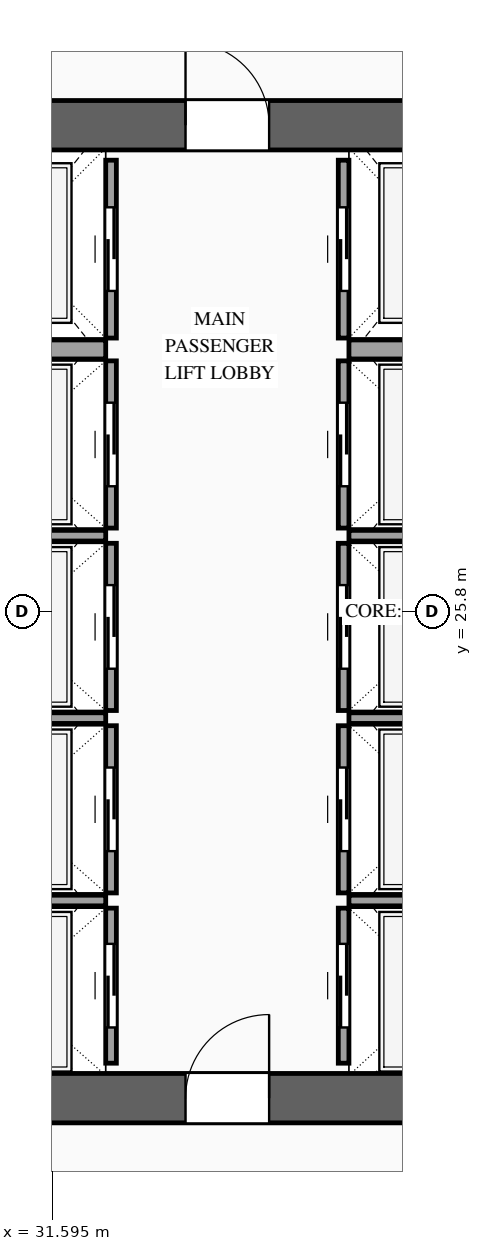
"""IFC4 building model, lengths in metres.
Left out: names, types, materials, properties, quantities, classifications, styles, units other than length and angle.
Written with IfcOpenShell. Run it as: python <this file> out.ifc"""

import sys

from ifc_helpers import new_model, si_unit, direction, frame, frame_2d, origin, place, context, subcontext, project, spatial, rectangle, extrude, source, transform, mapped, element, fill, save


model = new_model("IFC4")
c1 = context("Model", 3, precision=1e-05, world=origin(), true_north=direction((0.0, 1.0)))
c2 = subcontext(c1, "Body", "Model", "MODEL_VIEW")
j1 = project(units=[si_unit("LENGTHUNIT", "METRE"), si_unit("PLANEANGLEUNIT", "RADIAN")], contexts=[c1])
p1 = place(None, origin())
s1 = spatial("IfcSite", under=j1, at=p1, CompositionType="ELEMENT")
p2 = place(p1, origin())
s2 = spatial("IfcBuilding", under=s1, at=p2, CompositionType="ELEMENT")
p3 = place(p2, frame((0.0, 0.0, 166.8)))
s3 = spatial("IfcBuildingStorey", under=s2, at=p3, CompositionType="ELEMENT", Elevation=166.8)
p4 = place(p3, frame((23.475, 19.4, 0.0), z_axis=(0.0, 0.0, 1.0), x_axis=(1.0, 0.0, 0.0)))
e1 = element("IfcWall", 1, at=p4, inside=s3, PredefinedType="SHEAR", context=c2, shape_type="SweptSolid", body=[
    extrude(rectangle(XDim=27.05, YDim=0.65, at=frame_2d((13.525, 0.0))), origin(), (0.0, 0.0, 1.0), 4.8),
])
p5 = place(p4, frame((1.975, 0.0, 0.0)))
e2 = element("IfcOpeningElement", 2, at=p5, cuts=e1, PredefinedType="OPENING", context=c2, shape_type="SweptSolid", body=[
    extrude(rectangle(XDim=1.1, YDim=2.2, at=frame_2d((0.55, 1.1))), frame((0.0, 0.34, 0.0), z_axis=(0.0, -1.0, 0.0), x_axis=(1.0, 0.0, 0.0)), (0.0, 0.0, 1.0), 0.68),
])
p6 = place(p4, frame((9.875, 0.0, 0.0)))
e3 = element("IfcOpeningElement", 3, at=p6, cuts=e1, PredefinedType="OPENING", context=c2, shape_type="SweptSolid", body=[
    extrude(rectangle(XDim=1.1, YDim=2.2, at=frame_2d((0.55, 1.1))), frame((0.0, 0.34, 0.0), z_axis=(0.0, -1.0, 0.0), x_axis=(1.0, 0.0, 0.0)), (0.0, 0.0, 1.0), 0.68),
])
p7 = place(p4, frame((23.075, 0.0, 0.0)))
e4 = element("IfcOpeningElement", 4, at=p7, cuts=e1, PredefinedType="OPENING", context=c2, shape_type="SweptSolid", body=[
    extrude(rectangle(XDim=1.1, YDim=2.2, at=frame_2d((0.55, 1.1))), frame((0.0, 0.34, 0.0), z_axis=(0.0, -1.0, 0.0), x_axis=(1.0, 0.0, 0.0)), (0.0, 0.0, 1.0), 0.68),
])
p8 = place(p4, frame((19.695, 0.0, 0.0)))
e5 = element("IfcOpeningElement", 5, at=p8, cuts=e1, PredefinedType="OPENING", context=c2, shape_type="SweptSolid", body=[
    extrude(rectangle(XDim=0.9, YDim=2.15, at=frame_2d((0.45, 1.075))), frame((0.0, 0.34, 0.0), z_axis=(0.0, -1.0, 0.0), x_axis=(1.0, 0.0, 0.0)), (0.0, 0.0, 1.0), 0.68),
])
p9 = place(p4, frame((18.255, 0.0, 0.0)))
e6 = element("IfcOpeningElement", 6, at=p9, cuts=e1, PredefinedType="OPENING", context=c2, shape_type="SweptSolid", body=[
    extrude(rectangle(XDim=0.9, YDim=2.15, at=frame_2d((0.45, 1.075))), frame((0.0, 0.34, 0.0), z_axis=(0.0, -1.0, 0.0), x_axis=(1.0, 0.0, 0.0)), (0.0, 0.0, 1.0), 0.68),
])
p10 = place(p3, frame((23.475, 32.2, 0.0), z_axis=(0.0, 0.0, 1.0), x_axis=(1.0, 0.0, 0.0)))
e7 = element("IfcWall", 7, at=p10, inside=s3, PredefinedType="SHEAR", context=c2, shape_type="SweptSolid", body=[
    extrude(rectangle(XDim=27.05, YDim=0.65, at=frame_2d((13.525, 0.0))), origin(), (0.0, 0.0, 1.0), 4.8),
])
p11 = place(p10, frame((4.595, 0.0, 0.0)))
e8 = element("IfcOpeningElement", 8, at=p11, cuts=e7, PredefinedType="OPENING", context=c2, shape_type="SweptSolid", body=[
    extrude(rectangle(XDim=0.9, YDim=2.15, at=frame_2d((0.45, 1.075))), frame((0.0, 0.34, 0.0), z_axis=(0.0, -1.0, 0.0), x_axis=(1.0, 0.0, 0.0)), (0.0, 0.0, 1.0), 0.68),
])
p12 = place(p10, frame((9.875, 0.0, 0.0)))
e9 = element("IfcOpeningElement", 9, at=p12, cuts=e7, PredefinedType="OPENING", context=c2, shape_type="SweptSolid", body=[
    extrude(rectangle(XDim=1.1, YDim=2.2, at=frame_2d((0.55, 1.1))), frame((0.0, 0.34, 0.0), z_axis=(0.0, -1.0, 0.0), x_axis=(1.0, 0.0, 0.0)), (0.0, 0.0, 1.0), 0.68),
])
p13 = place(p10, frame((15.725, 0.0, 0.0)))
e10 = element("IfcOpeningElement", 10, at=p13, cuts=e7, PredefinedType="OPENING", context=c2, shape_type="SweptSolid", body=[
    extrude(rectangle(XDim=1.1, YDim=2.2, at=frame_2d((0.55, 1.1))), frame((0.0, 0.34, 0.0), z_axis=(0.0, -1.0, 0.0), x_axis=(1.0, 0.0, 0.0)), (0.0, 0.0, 1.0), 0.68),
])
p14 = place(p10, frame((18.825, 0.0, 0.0)))
e11 = element("IfcOpeningElement", 11, at=p14, cuts=e7, PredefinedType="OPENING", context=c2, shape_type="SweptSolid", body=[
    extrude(rectangle(XDim=1.1, YDim=2.2, at=frame_2d((0.55, 1.1))), frame((0.0, 0.34, 0.0), z_axis=(0.0, -1.0, 0.0), x_axis=(1.0, 0.0, 0.0)), (0.0, 0.0, 1.0), 0.68),
])
p15 = place(p3, frame((32.37, 19.86, 0.0), z_axis=(0.0, 0.0, 1.0), x_axis=(0.0, 1.0, 0.0)))
e12 = element("IfcWall", 12, at=p15, inside=s3, PredefinedType="SOLIDWALL", context=c2, shape_type="SweptSolid", body=[
    extrude(rectangle(XDim=2.04, YDim=0.14, at=frame_2d((1.02, 0.0))), origin(), (0.0, 0.0, 1.0), 4.5),
])
p16 = place(p15, frame((0.47, 0.0, 0.0)))
e13 = element("IfcOpeningElement", 13, at=p16, cuts=e12, PredefinedType="OPENING", context=c2, shape_type="SweptSolid", body=[
    extrude(rectangle(XDim=1.1, YDim=2.2, at=frame_2d((0.55, 1.1))), frame((0.0, 0.085, 0.0), z_axis=(0.0, -1.0, 0.0), x_axis=(1.0, 0.0, 0.0)), (0.0, 0.0, 1.0), 0.17),
])
m1 = source(origin(), c2, "Body", "SweptSolid", [
    extrude(rectangle(XDim=2.5, YDim=0.14, at=frame_2d((1.25, 0.0))), origin(), (0.0, 0.0, 1.0), 4.5),
])
p17 = place(p3, frame((29.8, 22.0, 0.0), z_axis=(0.0, 0.0, 1.0), x_axis=(1.0, 0.0, 0.0)))
e14 = element("IfcWall", 14, at=p17, inside=s3, PredefinedType="SOLIDWALL", context=c2, shape_type="MappedRepresentation", body=[
    mapped(m1, transform((0.0, 0.0, 0.0), scale=1.0)),
])
p18 = place(p3, frame((32.37, 22.1, 0.0), z_axis=(0.0, 0.0, 1.0), x_axis=(0.0, 1.0, 0.0)))
e15 = element("IfcWall", 15, at=p18, inside=s3, PredefinedType="SOLIDWALL", context=c2, shape_type="SweptSolid", body=[
    extrude(rectangle(XDim=2.2, YDim=0.14, at=frame_2d((1.1, 0.0))), origin(), (0.0, 0.0, 1.0), 4.5),
])
p19 = place(p18, frame((0.55, 0.0, 0.0)))
e16 = element("IfcOpeningElement", 16, at=p19, cuts=e15, PredefinedType="OPENING", context=c2, shape_type="SweptSolid", body=[
    extrude(rectangle(XDim=1.1, YDim=2.2, at=frame_2d((0.55, 1.1))), frame((0.0, 0.085, 0.0), z_axis=(0.0, -1.0, 0.0), x_axis=(1.0, 0.0, 0.0)), (0.0, 0.0, 1.0), 0.17),
])
p20 = place(p3, frame((29.8, 24.4, 0.0), z_axis=(0.0, 0.0, 1.0), x_axis=(1.0, 0.0, 0.0)))
e17 = element("IfcWall", 17, at=p20, inside=s3, PredefinedType="SOLIDWALL", context=c2, shape_type="MappedRepresentation", body=[
    mapped(m1, transform((0.0, 0.0, 0.0), scale=1.0)),
])
p21 = place(p3, frame((32.37, 24.5, 0.0), z_axis=(0.0, 0.0, 1.0), x_axis=(0.0, 1.0, 0.0)))
e18 = element("IfcWall", 18, at=p21, inside=s3, PredefinedType="SOLIDWALL", context=c2, shape_type="SweptSolid", body=[
    extrude(rectangle(XDim=2.2, YDim=0.14, at=frame_2d((1.1, 0.0))), origin(), (0.0, 0.0, 1.0), 4.5),
])
p22 = place(p21, frame((0.55, 0.0, 0.0)))
e19 = element("IfcOpeningElement", 19, at=p22, cuts=e18, PredefinedType="OPENING", context=c2, shape_type="SweptSolid", body=[
    extrude(rectangle(XDim=1.1, YDim=2.2, at=frame_2d((0.55, 1.1))), frame((0.0, 0.085, 0.0), z_axis=(0.0, -1.0, 0.0), x_axis=(1.0, 0.0, 0.0)), (0.0, 0.0, 1.0), 0.17),
])
p23 = place(p3, frame((29.8, 26.8, 0.0), z_axis=(0.0, 0.0, 1.0), x_axis=(1.0, 0.0, 0.0)))
e20 = element("IfcWall", 20, at=p23, inside=s3, PredefinedType="SOLIDWALL", context=c2, shape_type="MappedRepresentation", body=[
    mapped(m1, transform((0.0, 0.0, 0.0), scale=1.0)),
])
p24 = place(p3, frame((32.37, 26.9, 0.0), z_axis=(0.0, 0.0, 1.0), x_axis=(0.0, 1.0, 0.0)))
e21 = element("IfcWall", 21, at=p24, inside=s3, PredefinedType="SOLIDWALL", context=c2, shape_type="SweptSolid", body=[
    extrude(rectangle(XDim=2.2, YDim=0.14, at=frame_2d((1.1, 0.0))), origin(), (0.0, 0.0, 1.0), 4.5),
])
p25 = place(p24, frame((0.55, 0.0, 0.0)))
e22 = element("IfcOpeningElement", 22, at=p25, cuts=e21, PredefinedType="OPENING", context=c2, shape_type="SweptSolid", body=[
    extrude(rectangle(XDim=1.1, YDim=2.2, at=frame_2d((0.55, 1.1))), frame((0.0, 0.085, 0.0), z_axis=(0.0, -1.0, 0.0), x_axis=(1.0, 0.0, 0.0)), (0.0, 0.0, 1.0), 0.17),
])
p26 = place(p3, frame((32.37, 29.4, 0.0), z_axis=(0.0, 0.0, 1.0), x_axis=(0.0, 1.0, 0.0)))
e23 = element("IfcWall", 23, at=p26, inside=s3, PredefinedType="SOLIDWALL", context=c2, shape_type="SweptSolid", body=[
    extrude(rectangle(XDim=2.34, YDim=0.14, at=frame_2d((1.17, 0.0))), origin(), (0.0, 0.0, 1.0), 4.5),
])
p27 = place(p26, frame((0.62, 0.0, 0.0)))
e24 = element("IfcOpeningElement", 24, at=p27, cuts=e23, PredefinedType="OPENING", context=c2, shape_type="SweptSolid", body=[
    extrude(rectangle(XDim=1.1, YDim=2.2, at=frame_2d((0.55, 1.1))), frame((0.0, 0.085, 0.0), z_axis=(0.0, -1.0, 0.0), x_axis=(1.0, 0.0, 0.0)), (0.0, 0.0, 1.0), 0.17),
])
m2 = source(origin(), c2, "Body", "SweptSolid", [
    extrude(rectangle(XDim=2.5, YDim=0.25, at=frame_2d((1.25, 0.0))), origin(), (0.0, 0.0, 1.0), 4.5),
])
p28 = place(p3, frame((29.8, 29.25, 0.0), z_axis=(0.0, 0.0, 1.0), x_axis=(1.0, 0.0, 0.0)))
e25 = element("IfcWall", 25, at=p28, inside=s3, PredefinedType="SOLIDWALL", context=c2, shape_type="MappedRepresentation", body=[
    mapped(m2, transform((0.0, 0.0, 0.0), scale=1.0)),
])
p29 = place(p3, frame((35.43, 19.86, 0.0), z_axis=(0.0, 0.0, 1.0), x_axis=(0.0, 1.0, 0.0)))
e26 = element("IfcWall", 26, at=p29, inside=s3, PredefinedType="SOLIDWALL", context=c2, shape_type="SweptSolid", body=[
    extrude(rectangle(XDim=2.04, YDim=0.14, at=frame_2d((1.02, 0.0))), origin(), (0.0, 0.0, 1.0), 4.5),
])
p30 = place(p29, frame((0.47, 0.0, 0.0)))
e27 = element("IfcOpeningElement", 27, at=p30, cuts=e26, PredefinedType="OPENING", context=c2, shape_type="SweptSolid", body=[
    extrude(rectangle(XDim=1.1, YDim=2.2, at=frame_2d((0.55, 1.1))), frame((0.0, 0.085, 0.0), z_axis=(0.0, -1.0, 0.0), x_axis=(1.0, 0.0, 0.0)), (0.0, 0.0, 1.0), 0.17),
])
m3 = source(origin(), c2, "Body", "SweptSolid", [
    extrude(rectangle(XDim=2.4, YDim=0.14, at=frame_2d((1.2, 0.0))), origin(), (0.0, 0.0, 1.0), 4.5),
])
p31 = place(p3, frame((35.5, 22.0, 0.0), z_axis=(0.0, 0.0, 1.0), x_axis=(1.0, 0.0, 0.0)))
e28 = element("IfcWall", 28, at=p31, inside=s3, PredefinedType="SOLIDWALL", context=c2, shape_type="MappedRepresentation", body=[
    mapped(m3, transform((0.0, 0.0, 0.0), scale=1.0)),
])
p32 = place(p3, frame((35.43, 22.1, 0.0), z_axis=(0.0, 0.0, 1.0), x_axis=(0.0, 1.0, 0.0)))
e29 = element("IfcWall", 29, at=p32, inside=s3, PredefinedType="SOLIDWALL", context=c2, shape_type="SweptSolid", body=[
    extrude(rectangle(XDim=2.2, YDim=0.14, at=frame_2d((1.1, 0.0))), origin(), (0.0, 0.0, 1.0), 4.5),
])
p33 = place(p32, frame((0.55, 0.0, 0.0)))
e30 = element("IfcOpeningElement", 30, at=p33, cuts=e29, PredefinedType="OPENING", context=c2, shape_type="SweptSolid", body=[
    extrude(rectangle(XDim=1.1, YDim=2.2, at=frame_2d((0.55, 1.1))), frame((0.0, 0.085, 0.0), z_axis=(0.0, -1.0, 0.0), x_axis=(1.0, 0.0, 0.0)), (0.0, 0.0, 1.0), 0.17),
])
p34 = place(p3, frame((35.5, 24.4, 0.0), z_axis=(0.0, 0.0, 1.0), x_axis=(1.0, 0.0, 0.0)))
e31 = element("IfcWall", 31, at=p34, inside=s3, PredefinedType="SOLIDWALL", context=c2, shape_type="MappedRepresentation", body=[
    mapped(m3, transform((0.0, 0.0, 0.0), scale=1.0)),
])
p35 = place(p3, frame((35.43, 24.5, 0.0), z_axis=(0.0, 0.0, 1.0), x_axis=(0.0, 1.0, 0.0)))
e32 = element("IfcWall", 32, at=p35, inside=s3, PredefinedType="SOLIDWALL", context=c2, shape_type="SweptSolid", body=[
    extrude(rectangle(XDim=2.2, YDim=0.14, at=frame_2d((1.1, 0.0))), origin(), (0.0, 0.0, 1.0), 4.5),
])
p36 = place(p35, frame((0.55, 0.0, 0.0)))
e33 = element("IfcOpeningElement", 33, at=p36, cuts=e32, PredefinedType="OPENING", context=c2, shape_type="SweptSolid", body=[
    extrude(rectangle(XDim=1.1, YDim=2.2, at=frame_2d((0.55, 1.1))), frame((0.0, 0.085, 0.0), z_axis=(0.0, -1.0, 0.0), x_axis=(1.0, 0.0, 0.0)), (0.0, 0.0, 1.0), 0.17),
])
p37 = place(p3, frame((35.5, 26.8, 0.0), z_axis=(0.0, 0.0, 1.0), x_axis=(1.0, 0.0, 0.0)))
e34 = element("IfcWall", 34, at=p37, inside=s3, PredefinedType="SOLIDWALL", context=c2, shape_type="MappedRepresentation", body=[
    mapped(m3, transform((0.0, 0.0, 0.0), scale=1.0)),
])
p38 = place(p3, frame((35.43, 26.9, 0.0), z_axis=(0.0, 0.0, 1.0), x_axis=(0.0, 1.0, 0.0)))
e35 = element("IfcWall", 35, at=p38, inside=s3, PredefinedType="SOLIDWALL", context=c2, shape_type="SweptSolid", body=[
    extrude(rectangle(XDim=2.2, YDim=0.14, at=frame_2d((1.1, 0.0))), origin(), (0.0, 0.0, 1.0), 4.5),
])
p39 = place(p38, frame((0.55, 0.0, 0.0)))
e36 = element("IfcOpeningElement", 36, at=p39, cuts=e35, PredefinedType="OPENING", context=c2, shape_type="SweptSolid", body=[
    extrude(rectangle(XDim=1.1, YDim=2.2, at=frame_2d((0.55, 1.1))), frame((0.0, 0.085, 0.0), z_axis=(0.0, -1.0, 0.0), x_axis=(1.0, 0.0, 0.0)), (0.0, 0.0, 1.0), 0.17),
])
p40 = place(p3, frame((35.43, 29.4, 0.0), z_axis=(0.0, 0.0, 1.0), x_axis=(0.0, 1.0, 0.0)))
e37 = element("IfcWall", 37, at=p40, inside=s3, PredefinedType="SOLIDWALL", context=c2, shape_type="SweptSolid", body=[
    extrude(rectangle(XDim=2.34, YDim=0.14, at=frame_2d((1.17, 0.0))), origin(), (0.0, 0.0, 1.0), 4.5),
])
p41 = place(p40, frame((0.62, 0.0, 0.0)))
e38 = element("IfcOpeningElement", 38, at=p41, cuts=e37, PredefinedType="OPENING", context=c2, shape_type="SweptSolid", body=[
    extrude(rectangle(XDim=1.1, YDim=2.2, at=frame_2d((0.55, 1.1))), frame((0.0, 0.085, 0.0), z_axis=(0.0, -1.0, 0.0), x_axis=(1.0, 0.0, 0.0)), (0.0, 0.0, 1.0), 0.17),
])
m4 = source(origin(), c2, "Body", "SweptSolid", [
    extrude(rectangle(XDim=2.4, YDim=0.25, at=frame_2d((1.2, 0.0))), origin(), (0.0, 0.0, 1.0), 4.5),
])
p42 = place(p3, frame((35.5, 29.25, 0.0), z_axis=(0.0, 0.0, 1.0), x_axis=(1.0, 0.0, 0.0)))
e39 = element("IfcWall", 39, at=p42, inside=s3, PredefinedType="SOLIDWALL", context=c2, shape_type="MappedRepresentation", body=[
    mapped(m4, transform((0.0, 0.0, 0.0), scale=1.0)),
])
m5 = source(origin(), c2, "Body", "SweptSolid", [
    extrude(rectangle(XDim=1.1, YDim=2.2, at=frame_2d((0.55, 1.1))), frame((0.0, 0.025, 0.0), z_axis=(0.0, -1.0, 0.0), x_axis=(1.0, 0.0, 0.0)), (0.0, 0.0, 1.0), 0.05),
])
p43 = place(p16, origin())
e40 = element("IfcDoor", 40, at=p43, inside=s3, OperationType="SLIDING_TO_LEFT", PredefinedType="DOOR", context=c2, shape_type="MappedRepresentation", body=[
    mapped(m5, transform((0.0, 0.0, 0.0), scale=1.0)),
])
fill(e13, e40)
p44 = place(p19, origin())
e41 = element("IfcDoor", 41, at=p44, inside=s3, OperationType="SLIDING_TO_RIGHT", PredefinedType="DOOR", context=c2, shape_type="MappedRepresentation", body=[
    mapped(m5, transform((0.0, 0.0, 0.0), scale=1.0)),
])
fill(e16, e41)
p45 = place(p22, origin())
e42 = element("IfcDoor", 42, at=p45, inside=s3, OperationType="SLIDING_TO_LEFT", PredefinedType="DOOR", context=c2, shape_type="MappedRepresentation", body=[
    mapped(m5, transform((0.0, 0.0, 0.0), scale=1.0)),
])
fill(e19, e42)
p46 = place(p25, origin())
e43 = element("IfcDoor", 43, at=p46, inside=s3, OperationType="SLIDING_TO_RIGHT", PredefinedType="DOOR", context=c2, shape_type="MappedRepresentation", body=[
    mapped(m5, transform((0.0, 0.0, 0.0), scale=1.0)),
])
fill(e22, e43)
p47 = place(p27, origin())
e44 = element("IfcDoor", 44, at=p47, inside=s3, OperationType="SLIDING_TO_LEFT", PredefinedType="DOOR", context=c2, shape_type="MappedRepresentation", body=[
    mapped(m5, transform((0.0, 0.0, 0.0), scale=1.0)),
])
fill(e24, e44)
p48 = place(p30, origin())
e45 = element("IfcDoor", 45, at=p48, inside=s3, OperationType="SLIDING_TO_RIGHT", PredefinedType="DOOR", context=c2, shape_type="MappedRepresentation", body=[
    mapped(m5, transform((0.0, 0.0, 0.0), scale=1.0)),
])
fill(e27, e45)
p49 = place(p33, origin())
e46 = element("IfcDoor", 46, at=p49, inside=s3, OperationType="SLIDING_TO_LEFT", PredefinedType="DOOR", context=c2, shape_type="MappedRepresentation", body=[
    mapped(m5, transform((0.0, 0.0, 0.0), scale=1.0)),
])
fill(e30, e46)
p50 = place(p36, origin())
e47 = element("IfcDoor", 47, at=p50, inside=s3, OperationType="SLIDING_TO_RIGHT", PredefinedType="DOOR", context=c2, shape_type="MappedRepresentation", body=[
    mapped(m5, transform((0.0, 0.0, 0.0), scale=1.0)),
])
fill(e33, e47)
p51 = place(p39, origin())
e48 = element("IfcDoor", 48, at=p51, inside=s3, OperationType="SLIDING_TO_LEFT", PredefinedType="DOOR", context=c2, shape_type="MappedRepresentation", body=[
    mapped(m5, transform((0.0, 0.0, 0.0), scale=1.0)),
])
fill(e36, e48)
p52 = place(p41, origin())
e49 = element("IfcDoor", 49, at=p52, inside=s3, OperationType="SLIDING_TO_RIGHT", PredefinedType="DOOR", context=c2, shape_type="MappedRepresentation", body=[
    mapped(m5, transform((0.0, 0.0, 0.0), scale=1.0)),
])
fill(e38, e49)
m6 = source(origin(), c2, "Body", "SweptSolid", [
    extrude(rectangle(XDim=1.1, YDim=2.2, at=frame_2d((0.55, 1.1))), frame((0.0, 0.025, 0.0), z_axis=(0.0, -1.0, 0.0), x_axis=(1.0, 0.0, 0.0)), (0.0, 0.0, 1.0), 0.05),
])
p53 = place(p6, origin())
e50 = element("IfcDoor", 50, at=p53, inside=s3, OperationType="SINGLE_SWING_RIGHT", PredefinedType="DOOR", context=c2, shape_type="MappedRepresentation", body=[
    mapped(m6, transform((0.0, 0.0, 0.0), scale=1.0)),
])
fill(e3, e50)
p54 = place(p12, origin())
e51 = element("IfcDoor", 51, at=p54, inside=s3, OperationType="SINGLE_SWING_LEFT", PredefinedType="DOOR", context=c2, shape_type="MappedRepresentation", body=[
    mapped(m6, transform((0.0, 0.0, 0.0), scale=1.0)),
])
fill(e9, e51)
save(model, sys.argv[1])
